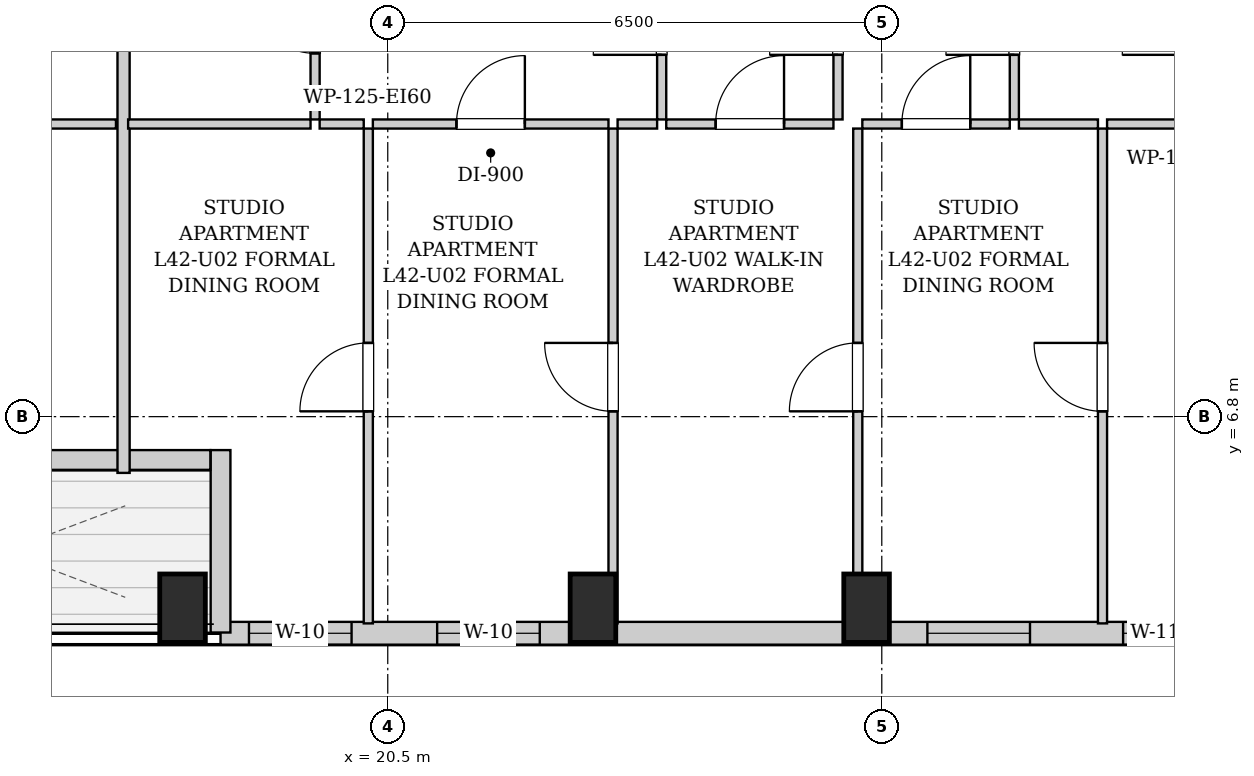
"""IFC4 building model, lengths in metres.
Left out: names, types, materials, properties, quantities, classifications, styles, units other than length and angle.
Written with IfcOpenShell. Run it as: python <this file> out.ifc"""

import sys

from ifc_helpers import new_model, si_unit, direction, frame, frame_2d, origin, origin_2d, place, context, subcontext, project, spatial, rectangle, extrude, element, fill, save


model = new_model("IFC4")
c1 = context("Model", 3, precision=1e-05, world=origin(), true_north=direction((0.0, 1.0)))
c2 = subcontext(c1, "Body", "Model", "MODEL_VIEW")
j1 = project(units=[si_unit("LENGTHUNIT", "METRE"), si_unit("PLANEANGLEUNIT", "RADIAN")], contexts=[c1])
p1 = place(None, origin())
s1 = spatial("IfcSite", under=j1, at=p1, CompositionType="ELEMENT")
p2 = place(p1, origin())
s2 = spatial("IfcBuilding", under=s1, at=p2, CompositionType="ELEMENT")
p3 = place(p2, frame((0.0, 0.0, 147.15)))
s3 = spatial("IfcBuildingStorey", under=s2, at=p3, CompositionType="ELEMENT", Elevation=147.15)
for number, where, z_axis, x_axis in (
    (1, (17.8, 4.28, 0.0), (0.0, 0.0, 1.0), (1.0, 0.0, 0.0)),
    (2, (23.2, 4.28, 0.0), (0.0, 0.0, 1.0), (1.0, 0.0, 0.0)),
    (3, (26.8, 4.28, 0.0), (0.0, 0.0, 1.0), (1.0, 0.0, 0.0)),
):
    element("IfcColumn", number, at=place(p3, frame(where, z_axis=z_axis, x_axis=x_axis)), inside=s3, PredefinedType="COLUMN", context=c2, shape_type="SweptSolid", body=[
        extrude(rectangle(XDim=0.6, YDim=0.9, at=origin_2d()), origin(), (0.0, 0.0, 1.0), 3.25),
    ])
p4 = place(p3, frame((31.5, 3.95, 0.0), z_axis=(0.0, 0.0, 1.0), x_axis=(-1.0, 0.0, 0.0)))
e4 = element("IfcWall", 4, at=p4, inside=s3, PredefinedType="SOLIDWALL", context=c2, shape_type="SweptSolid", body=[
    extrude(rectangle(XDim=13.2, YDim=0.3, at=frame_2d((6.6, 0.0))), origin(), (0.0, 0.0, 1.0), 2.99),
])
p5 = place(p4, frame((11.476, 0.0, 0.55)))
e5 = element("IfcOpeningElement", 5, at=p5, cuts=e4, PredefinedType="OPENING", context=c2, shape_type="SweptSolid", body=[
    extrude(rectangle(XDim=1.35, YDim=1.2, at=frame_2d((0.675, 0.6))), frame((0.0, 0.16, 0.0), z_axis=(0.0, -1.0, 0.0), x_axis=(1.0, 0.0, 0.0)), (0.0, 0.0, 1.0), 0.32),
])
p6 = place(p4, frame((9.0, 0.0, 0.55)))
e6 = element("IfcOpeningElement", 6, at=p6, cuts=e4, PredefinedType="OPENING", context=c2, shape_type="SweptSolid", body=[
    extrude(rectangle(XDim=1.35, YDim=1.2, at=frame_2d((0.675, 0.6))), frame((0.0, 0.16, 0.0), z_axis=(0.0, -1.0, 0.0), x_axis=(1.0, 0.0, 0.0)), (0.0, 0.0, 1.0), 0.32),
])
p7 = place(p4, frame((2.55, 0.0, 0.55)))
e7 = element("IfcOpeningElement", 7, at=p7, cuts=e4, PredefinedType="OPENING", context=c2, shape_type="SweptSolid", body=[
    extrude(rectangle(XDim=1.35, YDim=1.2, at=frame_2d((0.675, 0.6))), frame((0.0, 0.16, 0.0), z_axis=(0.0, -1.0, 0.0), x_axis=(1.0, 0.0, 0.0)), (0.0, 0.0, 1.0), 0.32),
])
p8 = place(p4, frame((0.475, 0.0, 0.55)))
e8 = element("IfcOpeningElement", 8, at=p8, cuts=e4, PredefinedType="OPENING", context=c2, shape_type="SweptSolid", body=[
    extrude(rectangle(XDim=0.85, YDim=1.2, at=frame_2d((0.425, 0.6))), frame((0.0, 0.16, 0.0), z_axis=(0.0, -1.0, 0.0), x_axis=(1.0, 0.0, 0.0)), (0.0, 0.0, 1.0), 0.32),
])
p9 = place(p3, frame((18.3, 3.96, 0.0), z_axis=(0.0, 0.0, 1.0), x_axis=(0.0, 1.0, 0.0)))
e9 = element("IfcWall", 9, at=p9, inside=s3, PredefinedType="SOLIDWALL", context=c2, shape_type="SweptSolid", body=[
    extrude(rectangle(XDim=2.4, YDim=0.26, at=frame_2d((1.2, 0.0))), origin(), (0.0, 0.0, 1.0), 2.99),
])
p10 = place(p3, frame((18.166, 6.23, 0.0), z_axis=(0.0, 0.0, 1.0), x_axis=(-1.0, 0.0, 0.0)))
e10 = element("IfcWall", 10, at=p10, inside=s3, PredefinedType="SOLIDWALL", context=c2, shape_type="SweptSolid", body=[
    extrude(rectangle(XDim=5.432, YDim=0.26, at=frame_2d((2.716, 0.0))), origin(), (0.0, 0.0, 1.0), 2.99),
])
p11 = place(p10, frame((2.166, 0.0, 0.0)))
e11 = element("IfcOpeningElement", 11, at=p11, cuts=e10, PredefinedType="OPENING", context=c2, shape_type="SweptSolid", body=[
    extrude(rectangle(XDim=1.1, YDim=2.0, at=frame_2d((0.55, 1.0))), frame((0.0, 0.14, 0.0), z_axis=(0.0, -1.0, 0.0), x_axis=(1.0, 0.0, 0.0)), (0.0, 0.0, 1.0), 0.28),
])
p12 = place(p3, frame((12.253, 10.65, 0.0), z_axis=(0.0, 0.0, 1.0), x_axis=(1.0, 0.0, 0.0)))
e12 = element("IfcWall", 12, at=p12, inside=s3, PredefinedType="PARTITIONING", context=c2, shape_type="SweptSolid", body=[
    extrude(rectangle(XDim=4.671, YDim=0.12, at=frame_2d((2.335, 0.0))), origin(), (0.0, 0.0, 1.0), 2.99),
])
p13 = place(p12, frame((1.885, 0.0, 0.0)))
e13 = element("IfcOpeningElement", 13, at=p13, cuts=e12, PredefinedType="OPENING", context=c2, shape_type="SweptSolid", body=[
    extrude(rectangle(XDim=0.9, YDim=2.05, at=frame_2d((0.45, 1.025))), frame((0.0, 0.07, 0.0), z_axis=(0.0, -1.0, 0.0), x_axis=(1.0, 0.0, 0.0)), (0.0, 0.0, 1.0), 0.14),
])
p14 = place(p3, frame((17.024, 6.06, 0.0), z_axis=(0.0, 0.0, 1.0), x_axis=(0.0, 1.0, 0.0)))
e14 = element("IfcWall", 14, at=p14, inside=s3, PredefinedType="PARTITIONING", context=c2, shape_type="SweptSolid", body=[
    extrude(rectangle(XDim=7.25, YDim=0.16, at=frame_2d((3.625, 0.0))), origin(), (0.0, 0.0, 1.0), 2.99),
])
p15 = place(p3, frame((19.544, 10.71, 0.0), z_axis=(0.0, 0.0, 1.0), x_axis=(0.0, 1.0, 0.0)))
e15 = element("IfcWall", 15, at=p15, inside=s3, PredefinedType="PARTITIONING", context=c2, shape_type="SweptSolid", body=[
    extrude(rectangle(XDim=2.6, YDim=0.12, at=frame_2d((1.3, 0.0))), origin(), (0.0, 0.0, 1.0), 2.99),
])
p16 = place(p15, frame((0.87, 0.0, 0.0)))
e16 = element("IfcOpeningElement", 16, at=p16, cuts=e15, PredefinedType="OPENING", context=c2, shape_type="SweptSolid", body=[
    extrude(rectangle(XDim=0.86, YDim=2.05, at=frame_2d((0.43, 1.025))), frame((0.0, 0.07, 0.0), z_axis=(0.0, -1.0, 0.0), x_axis=(1.0, 0.0, 0.0)), (0.0, 0.0, 1.0), 0.14),
])
p17 = place(p3, frame((17.084, 10.65, 0.0), z_axis=(0.0, 0.0, 1.0), x_axis=(1.0, 0.0, 0.0)))
e17 = element("IfcWall", 17, at=p17, inside=s3, PredefinedType="PARTITIONING", context=c2, shape_type="SweptSolid", body=[
    extrude(rectangle(XDim=2.4, YDim=0.12, at=frame_2d((1.2, 0.0))), origin(), (0.0, 0.0, 1.0), 2.99),
])
p18 = place(p3, frame((24.104, 10.71, 0.0), z_axis=(0.0, 0.0, 1.0), x_axis=(0.0, 1.0, 0.0)))
e18 = element("IfcWall", 18, at=p18, inside=s3, PredefinedType="PARTITIONING", context=c2, shape_type="SweptSolid", body=[
    extrude(rectangle(XDim=2.6, YDim=0.12, at=frame_2d((1.3, 0.0))), origin(), (0.0, 0.0, 1.0), 2.99),
])
p19 = place(p18, frame((0.85, 0.0, 0.0)))
e19 = element("IfcOpeningElement", 19, at=p19, cuts=e18, PredefinedType="OPENING", context=c2, shape_type="SweptSolid", body=[
    extrude(rectangle(XDim=0.9, YDim=2.05, at=frame_2d((0.45, 1.025))), frame((0.0, 0.07, 0.0), z_axis=(0.0, -1.0, 0.0), x_axis=(1.0, 0.0, 0.0)), (0.0, 0.0, 1.0), 0.14),
])
p20 = place(p3, frame((19.604, 10.65, 0.0), z_axis=(0.0, 0.0, 1.0), x_axis=(1.0, 0.0, 0.0)))
e20 = element("IfcWall", 20, at=p20, inside=s3, PredefinedType="PARTITIONING", context=c2, shape_type="SweptSolid", body=[
    extrude(rectangle(XDim=0.58, YDim=0.12, at=frame_2d((0.29, 0.0))), origin(), (0.0, 0.0, 1.0), 2.99),
])
p21 = place(p3, frame((20.304, 10.65, 0.0), z_axis=(0.0, 0.0, 1.0), x_axis=(1.0, 0.0, 0.0)))
e21 = element("IfcWall", 21, at=p21, inside=s3, PredefinedType="PARTITIONING", context=c2, shape_type="SweptSolid", body=[
    extrude(rectangle(XDim=3.1, YDim=0.12, at=frame_2d((1.55, 0.0))), origin(), (0.0, 0.0, 1.0), 2.99),
])
p22 = place(p21, frame((1.1, 0.0, 0.0)))
e22 = element("IfcOpeningElement", 22, at=p22, cuts=e21, PredefinedType="OPENING", context=c2, shape_type="SweptSolid", body=[
    extrude(rectangle(XDim=0.9, YDim=2.05, at=frame_2d((0.45, 1.025))), frame((0.0, 0.07, 0.0), z_axis=(0.0, -1.0, 0.0), x_axis=(1.0, 0.0, 0.0)), (0.0, 0.0, 1.0), 0.14),
])
p23 = place(p3, frame((23.524, 10.65, 0.0), z_axis=(0.0, 0.0, 1.0), x_axis=(1.0, 0.0, 0.0)))
e23 = element("IfcWall", 23, at=p23, inside=s3, PredefinedType="PARTITIONING", context=c2, shape_type="SweptSolid", body=[
    extrude(rectangle(XDim=0.52, YDim=0.12, at=frame_2d((0.26, 0.0))), origin(), (0.0, 0.0, 1.0), 2.99),
])
p24 = place(p3, frame((26.424, 10.71, 0.0), z_axis=(0.0, 0.0, 1.0), x_axis=(0.0, 1.0, 0.0)))
e24 = element("IfcWall", 24, at=p24, inside=s3, PredefinedType="PARTITIONING", context=c2, shape_type="SweptSolid", body=[
    extrude(rectangle(XDim=2.6, YDim=0.12, at=frame_2d((1.3, 0.0))), origin(), (0.0, 0.0, 1.0), 2.99),
])
p25 = place(p24, frame((0.85, 0.0, 0.0)))
e25 = element("IfcOpeningElement", 25, at=p25, cuts=e24, PredefinedType="OPENING", context=c2, shape_type="SweptSolid", body=[
    extrude(rectangle(XDim=0.9, YDim=2.05, at=frame_2d((0.45, 1.025))), frame((0.0, 0.07, 0.0), z_axis=(0.0, -1.0, 0.0), x_axis=(1.0, 0.0, 0.0)), (0.0, 0.0, 1.0), 0.14),
])
p26 = place(p3, frame((24.164, 10.65, 0.0), z_axis=(0.0, 0.0, 1.0), x_axis=(1.0, 0.0, 0.0)))
e26 = element("IfcWall", 26, at=p26, inside=s3, PredefinedType="PARTITIONING", context=c2, shape_type="SweptSolid", body=[
    extrude(rectangle(XDim=2.2, YDim=0.12, at=frame_2d((1.1, 0.0))), origin(), (0.0, 0.0, 1.0), 2.99),
])
p27 = place(p26, frame((0.65, 0.0, 0.0)))
e27 = element("IfcOpeningElement", 27, at=p27, cuts=e26, PredefinedType="OPENING", context=c2, shape_type="SweptSolid", body=[
    extrude(rectangle(XDim=0.9, YDim=2.05, at=frame_2d((0.45, 1.025))), frame((0.0, 0.07, 0.0), z_axis=(0.0, -1.0, 0.0), x_axis=(1.0, 0.0, 0.0)), (0.0, 0.0, 1.0), 0.14),
])
p28 = place(p3, frame((28.744, 10.71, 0.0), z_axis=(0.0, 0.0, 1.0), x_axis=(0.0, 1.0, 0.0)))
e28 = element("IfcWall", 28, at=p28, inside=s3, PredefinedType="PARTITIONING", context=c2, shape_type="SweptSolid", body=[
    extrude(rectangle(XDim=2.6, YDim=0.12, at=frame_2d((1.3, 0.0))), origin(), (0.0, 0.0, 1.0), 2.99),
])
p29 = place(p28, frame((0.85, 0.0, 0.0)))
e29 = element("IfcOpeningElement", 29, at=p29, cuts=e28, PredefinedType="OPENING", context=c2, shape_type="SweptSolid", body=[
    extrude(rectangle(XDim=0.9, YDim=2.05, at=frame_2d((0.45, 1.025))), frame((0.0, 0.07, 0.0), z_axis=(0.0, -1.0, 0.0), x_axis=(1.0, 0.0, 0.0)), (0.0, 0.0, 1.0), 0.14),
])
p30 = place(p3, frame((26.744, 10.65, 0.0), z_axis=(0.0, 0.0, 1.0), x_axis=(1.0, 0.0, 0.0)))
e30 = element("IfcWall", 30, at=p30, inside=s3, PredefinedType="PARTITIONING", context=c2, shape_type="SweptSolid", body=[
    extrude(rectangle(XDim=1.94, YDim=0.12, at=frame_2d((0.97, 0.0))), origin(), (0.0, 0.0, 1.0), 2.99),
])
p31 = place(p30, frame((0.52, 0.0, 0.0)))
e31 = element("IfcOpeningElement", 31, at=p31, cuts=e30, PredefinedType="OPENING", context=c2, shape_type="SweptSolid", body=[
    extrude(rectangle(XDim=0.9, YDim=2.05, at=frame_2d((0.45, 1.025))), frame((0.0, 0.07, 0.0), z_axis=(0.0, -1.0, 0.0), x_axis=(1.0, 0.0, 0.0)), (0.0, 0.0, 1.0), 0.14),
])
p32 = place(p3, frame((28.804, 10.65, 0.0), z_axis=(0.0, 0.0, 1.0), x_axis=(1.0, 0.0, 0.0)))
e32 = element("IfcWall", 32, at=p32, inside=s3, PredefinedType="PARTITIONING", context=c2, shape_type="SweptSolid", body=[
    extrude(rectangle(XDim=1.04, YDim=0.12, at=frame_2d((0.52, 0.0))), origin(), (0.0, 0.0, 1.0), 2.99),
])
p33 = place(p3, frame((29.964, 10.65, 0.0), z_axis=(0.0, 0.0, 1.0), x_axis=(1.0, 0.0, 0.0)))
e33 = element("IfcWall", 33, at=p33, inside=s3, PredefinedType="PARTITIONING", context=c2, shape_type="SweptSolid", body=[
    extrude(rectangle(XDim=1.04, YDim=0.12, at=frame_2d((0.52, 0.0))), origin(), (0.0, 0.0, 1.0), 2.99),
])
p34 = place(p3, frame((20.244, 4.08, 0.0), z_axis=(0.0, 0.0, 1.0), x_axis=(0.0, 1.0, 0.0)))
e34 = element("IfcWall", 34, at=p34, inside=s3, PredefinedType="PARTITIONING", context=c2, shape_type="SweptSolid", body=[
    extrude(rectangle(XDim=6.51, YDim=0.12, at=frame_2d((3.255, 0.0))), origin(), (0.0, 0.0, 1.0), 2.99),
])
p35 = place(p34, frame((2.79, 0.0, 0.0)))
e35 = element("IfcOpeningElement", 35, at=p35, cuts=e34, PredefinedType="OPENING", context=c2, shape_type="SweptSolid", body=[
    extrude(rectangle(XDim=0.9, YDim=2.05, at=frame_2d((0.45, 1.025))), frame((0.0, 0.07, 0.0), z_axis=(0.0, -1.0, 0.0), x_axis=(1.0, 0.0, 0.0)), (0.0, 0.0, 1.0), 0.14),
])
p36 = place(p3, frame((23.464, 4.08, 0.0), z_axis=(0.0, 0.0, 1.0), x_axis=(0.0, 1.0, 0.0)))
e36 = element("IfcWall", 36, at=p36, inside=s3, PredefinedType="PARTITIONING", context=c2, shape_type="SweptSolid", body=[
    extrude(rectangle(XDim=6.51, YDim=0.12, at=frame_2d((3.255, 0.0))), origin(), (0.0, 0.0, 1.0), 2.99),
])
p37 = place(p36, frame((2.79, 0.0, 0.0)))
e37 = element("IfcOpeningElement", 37, at=p37, cuts=e36, PredefinedType="OPENING", context=c2, shape_type="SweptSolid", body=[
    extrude(rectangle(XDim=0.9, YDim=2.05, at=frame_2d((0.45, 1.025))), frame((0.0, 0.07, 0.0), z_axis=(0.0, -1.0, 0.0), x_axis=(1.0, 0.0, 0.0)), (0.0, 0.0, 1.0), 0.14),
])
p38 = place(p3, frame((26.684, 4.08, 0.0), z_axis=(0.0, 0.0, 1.0), x_axis=(0.0, 1.0, 0.0)))
e38 = element("IfcWall", 38, at=p38, inside=s3, PredefinedType="PARTITIONING", context=c2, shape_type="SweptSolid", body=[
    extrude(rectangle(XDim=6.51, YDim=0.12, at=frame_2d((3.255, 0.0))), origin(), (0.0, 0.0, 1.0), 2.99),
])
p39 = place(p38, frame((2.79, 0.0, 0.0)))
e39 = element("IfcOpeningElement", 39, at=p39, cuts=e38, PredefinedType="OPENING", context=c2, shape_type="SweptSolid", body=[
    extrude(rectangle(XDim=0.9, YDim=2.05, at=frame_2d((0.45, 1.025))), frame((0.0, 0.07, 0.0), z_axis=(0.0, -1.0, 0.0), x_axis=(1.0, 0.0, 0.0)), (0.0, 0.0, 1.0), 0.14),
])
p40 = place(p3, frame((29.904, 4.08, 0.0), z_axis=(0.0, 0.0, 1.0), x_axis=(0.0, 1.0, 0.0)))
e40 = element("IfcWall", 40, at=p40, inside=s3, PredefinedType="PARTITIONING", context=c2, shape_type="SweptSolid", body=[
    extrude(rectangle(XDim=6.51, YDim=0.12, at=frame_2d((3.255, 0.0))), origin(), (0.0, 0.0, 1.0), 2.99),
])
p41 = place(p40, frame((2.79, 0.0, 0.0)))
e41 = element("IfcOpeningElement", 41, at=p41, cuts=e40, PredefinedType="OPENING", context=c2, shape_type="SweptSolid", body=[
    extrude(rectangle(XDim=0.9, YDim=2.05, at=frame_2d((0.45, 1.025))), frame((0.0, 0.07, 0.0), z_axis=(0.0, -1.0, 0.0), x_axis=(1.0, 0.0, 0.0)), (0.0, 0.0, 1.0), 0.14),
])
p42 = place(p16, origin())
e42 = element("IfcDoor", 42, at=p42, inside=s3, OperationType="SINGLE_SWING_RIGHT", PredefinedType="DOOR", context=c2, shape_type="SweptSolid", body=[
    extrude(rectangle(XDim=0.86, YDim=2.05, at=frame_2d((0.43, 1.025))), frame((0.0, 0.025, 0.0), z_axis=(0.0, -1.0, 0.0), x_axis=(1.0, 0.0, 0.0)), (0.0, 0.0, 1.0), 0.05),
])
fill(e16, e42)
p43 = place(p19, origin())
e43 = element("IfcDoor", 43, at=p43, inside=s3, OperationType="SINGLE_SWING_LEFT", PredefinedType="DOOR", context=c2, shape_type="SweptSolid", body=[
    extrude(rectangle(XDim=0.9, YDim=2.05, at=frame_2d((0.45, 1.025))), frame((0.0, 0.025, 0.0), z_axis=(0.0, -1.0, 0.0), x_axis=(1.0, 0.0, 0.0)), (0.0, 0.0, 1.0), 0.05),
])
fill(e19, e43)
p44 = place(p22, origin())
e44 = element("IfcDoor", 44, at=p44, inside=s3, OperationType="SINGLE_SWING_RIGHT", PredefinedType="DOOR", context=c2, shape_type="SweptSolid", body=[
    extrude(rectangle(XDim=0.9, YDim=2.05, at=frame_2d((0.45, 1.025))), frame((0.0, 0.025, 0.0), z_axis=(0.0, -1.0, 0.0), x_axis=(1.0, 0.0, 0.0)), (0.0, 0.0, 1.0), 0.05),
])
fill(e22, e44)
p45 = place(p25, origin())
e45 = element("IfcDoor", 45, at=p45, inside=s3, OperationType="SINGLE_SWING_LEFT", PredefinedType="DOOR", context=c2, shape_type="SweptSolid", body=[
    extrude(rectangle(XDim=0.9, YDim=2.05, at=frame_2d((0.45, 1.025))), frame((0.0, 0.025, 0.0), z_axis=(0.0, -1.0, 0.0), x_axis=(1.0, 0.0, 0.0)), (0.0, 0.0, 1.0), 0.05),
])
fill(e25, e45)
p46 = place(p27, origin())
e46 = element("IfcDoor", 46, at=p46, inside=s3, OperationType="SINGLE_SWING_RIGHT", PredefinedType="DOOR", context=c2, shape_type="SweptSolid", body=[
    extrude(rectangle(XDim=0.9, YDim=2.05, at=frame_2d((0.45, 1.025))), frame((0.0, 0.025, 0.0), z_axis=(0.0, -1.0, 0.0), x_axis=(1.0, 0.0, 0.0)), (0.0, 0.0, 1.0), 0.05),
])
fill(e27, e46)
p47 = place(p29, origin())
e47 = element("IfcDoor", 47, at=p47, inside=s3, OperationType="SINGLE_SWING_LEFT", PredefinedType="DOOR", context=c2, shape_type="SweptSolid", body=[
    extrude(rectangle(XDim=0.9, YDim=2.05, at=frame_2d((0.45, 1.025))), frame((0.0, 0.025, 0.0), z_axis=(0.0, -1.0, 0.0), x_axis=(1.0, 0.0, 0.0)), (0.0, 0.0, 1.0), 0.05),
])
fill(e29, e47)
p48 = place(p31, origin())
e48 = element("IfcDoor", 48, at=p48, inside=s3, OperationType="SINGLE_SWING_RIGHT", PredefinedType="DOOR", context=c2, shape_type="SweptSolid", body=[
    extrude(rectangle(XDim=0.9, YDim=2.05, at=frame_2d((0.45, 1.025))), frame((0.0, 0.025, 0.0), z_axis=(0.0, -1.0, 0.0), x_axis=(1.0, 0.0, 0.0)), (0.0, 0.0, 1.0), 0.05),
])
fill(e31, e48)
p49 = place(p35, origin())
e49 = element("IfcDoor", 49, at=p49, inside=s3, OperationType="SINGLE_SWING_LEFT", PredefinedType="DOOR", context=c2, shape_type="SweptSolid", body=[
    extrude(rectangle(XDim=0.9, YDim=2.05, at=frame_2d((0.45, 1.025))), frame((0.0, 0.025, 0.0), z_axis=(0.0, -1.0, 0.0), x_axis=(1.0, 0.0, 0.0)), (0.0, 0.0, 1.0), 0.05),
])
fill(e35, e49)
p50 = place(p37, origin())
e50 = element("IfcDoor", 50, at=p50, inside=s3, OperationType="SINGLE_SWING_RIGHT", PredefinedType="DOOR", context=c2, shape_type="SweptSolid", body=[
    extrude(rectangle(XDim=0.9, YDim=2.05, at=frame_2d((0.45, 1.025))), frame((0.0, 0.025, 0.0), z_axis=(0.0, -1.0, 0.0), x_axis=(1.0, 0.0, 0.0)), (0.0, 0.0, 1.0), 0.05),
])
fill(e37, e50)
p51 = place(p39, origin())
e51 = element("IfcDoor", 51, at=p51, inside=s3, OperationType="SINGLE_SWING_LEFT", PredefinedType="DOOR", context=c2, shape_type="SweptSolid", body=[
    extrude(rectangle(XDim=0.9, YDim=2.05, at=frame_2d((0.45, 1.025))), frame((0.0, 0.025, 0.0), z_axis=(0.0, -1.0, 0.0), x_axis=(1.0, 0.0, 0.0)), (0.0, 0.0, 1.0), 0.05),
])
fill(e39, e51)
p52 = place(p41, origin())
e52 = element("IfcDoor", 52, at=p52, inside=s3, OperationType="SINGLE_SWING_RIGHT", PredefinedType="DOOR", context=c2, shape_type="SweptSolid", body=[
    extrude(rectangle(XDim=0.9, YDim=2.05, at=frame_2d((0.45, 1.025))), frame((0.0, 0.025, 0.0), z_axis=(0.0, -1.0, 0.0), x_axis=(1.0, 0.0, 0.0)), (0.0, 0.0, 1.0), 0.05),
])
fill(e41, e52)
p53 = place(p5, origin())
e53 = element("IfcWindow", 53, at=p53, inside=s3, PartitioningType="SINGLE_PANEL", PredefinedType="WINDOW", context=c2, shape_type="SweptSolid", body=[
    extrude(rectangle(XDim=1.35, YDim=1.2, at=frame_2d((0.675, 0.6))), frame((0.0, 0.03, 0.0), z_axis=(0.0, -1.0, 0.0), x_axis=(1.0, 0.0, 0.0)), (0.0, 0.0, 1.0), 0.06),
])
fill(e5, e53)
p54 = place(p6, origin())
e54 = element("IfcWindow", 54, at=p54, inside=s3, PartitioningType="SINGLE_PANEL", PredefinedType="WINDOW", context=c2, shape_type="SweptSolid", body=[
    extrude(rectangle(XDim=1.35, YDim=1.2, at=frame_2d((0.675, 0.6))), frame((0.0, 0.03, 0.0), z_axis=(0.0, -1.0, 0.0), x_axis=(1.0, 0.0, 0.0)), (0.0, 0.0, 1.0), 0.06),
])
fill(e6, e54)
p55 = place(p7, origin())
e55 = element("IfcWindow", 55, at=p55, inside=s3, PartitioningType="SINGLE_PANEL", PredefinedType="WINDOW", context=c2, shape_type="SweptSolid", body=[
    extrude(rectangle(XDim=1.35, YDim=1.2, at=frame_2d((0.675, 0.6))), frame((0.0, 0.03, 0.0), z_axis=(0.0, -1.0, 0.0), x_axis=(1.0, 0.0, 0.0)), (0.0, 0.0, 1.0), 0.06),
])
fill(e7, e55)
p56 = place(p8, origin())
e56 = element("IfcWindow", 56, at=p56, inside=s3, PartitioningType="SINGLE_PANEL", PredefinedType="WINDOW", context=c2, shape_type="SweptSolid", body=[
    extrude(rectangle(XDim=0.85, YDim=1.2, at=frame_2d((0.425, 0.6))), frame((0.0, 0.03, 0.0), z_axis=(0.0, -1.0, 0.0), x_axis=(1.0, 0.0, 0.0)), (0.0, 0.0, 1.0), 0.06),
])
fill(e8, e56)
save(model, sys.argv[1])
